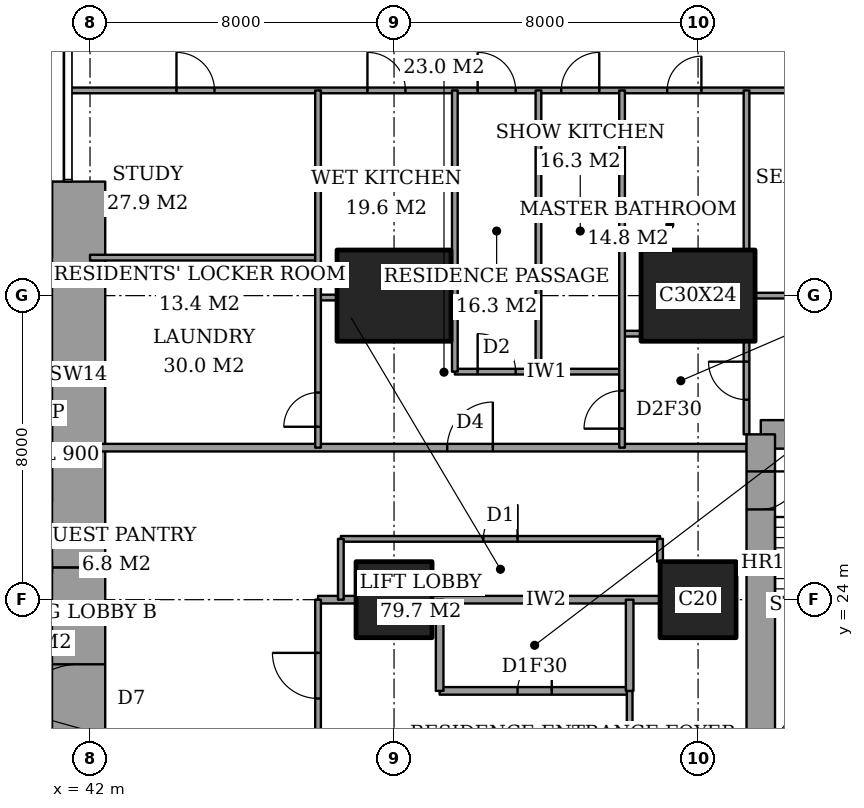
"""IFC4 building model, lengths in metres.
Left out: names, types, materials, properties, quantities, classifications, styles, units other than length and angle.
Written with IfcOpenShell. Run it as: python <this file> out.ifc"""

import sys

from ifc_helpers import new_model, si_unit, direction, frame, frame_2d, origin, origin_2d, place, context, subcontext, project, spatial, rectangle, extrude, element, fill, save


model = new_model("IFC4")
c1 = context("Model", 3, precision=1e-05, world=origin(), true_north=direction((0.0, 1.0)))
c2 = subcontext(c1, "Body", "Model", "MODEL_VIEW")
j1 = project(units=[si_unit("LENGTHUNIT", "METRE"), si_unit("PLANEANGLEUNIT", "RADIAN")], contexts=[c1])
p1 = place(None, origin())
s1 = spatial("IfcSite", under=j1, at=p1, CompositionType="ELEMENT")
p2 = place(p1, origin())
s2 = spatial("IfcBuilding", under=s1, at=p2, CompositionType="ELEMENT")
p3 = place(p2, frame((0.0, 0.0, 110.6)))
s3 = spatial("IfcBuildingStorey", under=s2, at=p3, CompositionType="ELEMENT", Elevation=110.6)
p4 = place(p3, frame((50.0, 24.0, 0.0), z_axis=(0.0, 0.0, 1.0), x_axis=(1.0, 0.0, 0.0)))
e1 = element("IfcColumn", 1, at=p4, inside=s3, PredefinedType="COLUMN", context=c2, shape_type="SweptSolid", body=[
    extrude(rectangle(XDim=2.0, YDim=2.0, at=origin_2d()), origin(), (0.0, 0.0, 1.0), 3.6),
])
p5 = place(p3, frame((50.0, 32.0, 0.0), z_axis=(0.0, 0.0, 1.0), x_axis=(1.0, 0.0, 0.0)))
e2 = element("IfcColumn", 2, at=p5, inside=s3, PredefinedType="COLUMN", context=c2, shape_type="SweptSolid", body=[
    extrude(rectangle(XDim=3.0, YDim=2.4, at=origin_2d()), origin(), (0.0, 0.0, 1.0), 3.6),
])
p6 = place(p3, frame((58.0, 24.0, 0.0), z_axis=(0.0, 0.0, 1.0), x_axis=(1.0, 0.0, 0.0)))
e3 = element("IfcColumn", 3, at=p6, inside=s3, PredefinedType="COLUMN", context=c2, shape_type="SweptSolid", body=[
    extrude(rectangle(XDim=2.0, YDim=2.0, at=origin_2d()), origin(), (0.0, 0.0, 1.0), 3.6),
])
p7 = place(p3, frame((58.0, 32.0, 0.0), z_axis=(0.0, 0.0, 1.0), x_axis=(1.0, 0.0, 0.0)))
e4 = element("IfcColumn", 4, at=p7, inside=s3, PredefinedType="COLUMN", context=c2, shape_type="SweptSolid", body=[
    extrude(rectangle(XDim=3.0, YDim=2.4, at=origin_2d()), origin(), (0.0, 0.0, 1.0), 3.6),
])
p8 = place(p3, frame((41.7, 13.0, 0.0), z_axis=(0.0, 0.0, 1.0), x_axis=(0.0, 1.0, 0.0)))
e5 = element("IfcWall", 5, at=p8, inside=s3, PredefinedType="SHEAR", context=c2, shape_type="SweptSolid", body=[
    extrude(rectangle(XDim=11.85, YDim=1.4, at=frame_2d((5.925, 0.0))), origin(), (0.0, 0.0, 1.0), 3.6),
])
p9 = place(p8, frame((7.5, 0.0, 0.0)))
e6 = element("IfcOpeningElement", 6, at=p9, cuts=e5, PredefinedType="OPENING", context=c2, shape_type="SweptSolid", body=[
    extrude(rectangle(XDim=1.8, YDim=2.4, at=frame_2d((0.9, 1.2))), frame((0.0, 0.71, 0.0), z_axis=(0.0, -1.0, 0.0), x_axis=(1.0, 0.0, 0.0)), (0.0, 0.0, 1.0), 1.42),
])
p10 = place(p3, frame((41.7, 24.85, 0.0), z_axis=(0.0, 0.0, 1.0), x_axis=(0.0, 1.0, 0.0)))
e7 = element("IfcWall", 7, at=p10, inside=s3, PredefinedType="SHEAR", context=c2, shape_type="SweptSolid", body=[
    extrude(rectangle(XDim=10.15, YDim=1.4, at=frame_2d((5.075, 0.0))), origin(), (0.0, 0.0, 1.0), 3.6),
])
p11 = place(p3, frame((64.1, 28.35, 0.0), z_axis=(0.0, 0.0, 1.0), x_axis=(-1.0, 0.0, 0.0)))
e8 = element("IfcWall", 8, at=p11, inside=s3, PredefinedType="SHEAR", context=c2, shape_type="SweptSolid", body=[
    extrude(rectangle(XDim=4.45, YDim=0.75, at=frame_2d((2.225, 0.0))), origin(), (0.0, 0.0, 1.0), 3.6),
])
p12 = place(p3, frame((59.65, 28.35, 0.0), z_axis=(0.0, 0.0, 1.0), x_axis=(0.0, -1.0, 0.0)))
e9 = element("IfcWall", 9, at=p12, inside=s3, PredefinedType="SHEAR", context=c2, shape_type="SweptSolid", body=[
    extrude(rectangle(XDim=8.7, YDim=0.75, at=frame_2d((4.35, 0.0))), origin(), (0.0, 0.0, 1.0), 3.6),
])
p13 = place(p12, frame((0.975, 0.0, 0.0)))
e10 = element("IfcOpeningElement", 10, at=p13, cuts=e9, PredefinedType="OPENING", context=c2, shape_type="SweptSolid", body=[
    extrude(rectangle(XDim=1.0, YDim=2.1, at=frame_2d((0.5, 1.05))), frame((0.0, 0.385, 0.0), z_axis=(0.0, -1.0, 0.0), x_axis=(1.0, 0.0, 0.0)), (0.0, 0.0, 1.0), 0.77),
])
p14 = place(p3, frame((51.2, 21.6, 0.0), z_axis=(0.0, 0.0, 1.0), x_axis=(1.0, 0.0, 0.0)))
e11 = element("IfcWall", 11, at=p14, inside=s3, PredefinedType="PARTITIONING", context=c2, shape_type="SweptSolid", body=[
    extrude(rectangle(XDim=5.0, YDim=0.2, at=frame_2d((2.5, 0.0))), origin(), (0.0, 0.0, 1.0), 3.35),
])
p15 = place(p14, frame((2.05, 0.0, 0.0)))
e12 = element("IfcOpeningElement", 12, at=p15, cuts=e11, PredefinedType="OPENING", context=c2, shape_type="SweptSolid", body=[
    extrude(rectangle(XDim=0.9, YDim=2.1, at=frame_2d((0.45, 1.05))), frame((0.0, 0.11, 0.0), z_axis=(0.0, -1.0, 0.0), x_axis=(1.0, 0.0, 0.0)), (0.0, 0.0, 1.0), 0.22),
])
p16 = place(p3, frame((48.0, 24.0, 0.0), z_axis=(0.0, 0.0, 1.0), x_axis=(1.0, 0.0, 0.0)))
e13 = element("IfcWall", 13, at=p16, inside=s3, PredefinedType="PARTITIONING", context=c2, shape_type="SweptSolid", body=[
    extrude(rectangle(XDim=1.0, YDim=0.2, at=frame_2d((0.5, 0.0))), origin(), (0.0, 0.0, 1.0), 3.35),
])
p17 = place(p3, frame((51.0, 24.0, 0.0), z_axis=(0.0, 0.0, 1.0), x_axis=(1.0, 0.0, 0.0)))
e14 = element("IfcWall", 14, at=p17, inside=s3, PredefinedType="PARTITIONING", context=c2, shape_type="SweptSolid", body=[
    extrude(rectangle(XDim=6.0, YDim=0.2, at=frame_2d((3.0, 0.0))), origin(), (0.0, 0.0, 1.0), 3.35),
])
p18 = place(p3, frame((48.6, 25.6, 0.0), z_axis=(0.0, 0.0, 1.0), x_axis=(1.0, 0.0, 0.0)))
e15 = element("IfcWall", 15, at=p18, inside=s3, PredefinedType="PARTITIONING", context=c2, shape_type="SweptSolid", body=[
    extrude(rectangle(XDim=8.4, YDim=0.15, at=frame_2d((4.2, 0.0))), origin(), (0.0, 0.0, 1.0), 3.35),
])
p19 = place(p18, frame((3.75, 0.0, 0.0)))
e16 = element("IfcOpeningElement", 16, at=p19, cuts=e15, PredefinedType="OPENING", context=c2, shape_type="SweptSolid", body=[
    extrude(rectangle(XDim=0.9, YDim=2.1, at=frame_2d((0.45, 1.05))), frame((0.0, 0.085, 0.0), z_axis=(0.0, -1.0, 0.0), x_axis=(1.0, 0.0, 0.0)), (0.0, 0.0, 1.0), 0.17),
])
p20 = place(p3, frame((42.0, 28.0, 0.0), z_axis=(0.0, 0.0, 1.0), x_axis=(1.0, 0.0, 0.0)))
e17 = element("IfcWall", 17, at=p20, inside=s3, PredefinedType="PARTITIONING", context=c2, shape_type="SweptSolid", body=[
    extrude(rectangle(XDim=17.275, YDim=0.2, at=frame_2d((8.637, 0.0))), origin(), (0.0, 0.0, 1.0), 3.35),
])
p21 = place(p20, frame((9.4, 0.0, 0.0)))
e18 = element("IfcOpeningElement", 18, at=p21, cuts=e17, PredefinedType="OPENING", context=c2, shape_type="SweptSolid", body=[
    extrude(rectangle(XDim=1.2, YDim=2.4, at=frame_2d((0.6, 1.2))), frame((0.0, 0.11, 0.0), z_axis=(0.0, -1.0, 0.0), x_axis=(1.0, 0.0, 0.0)), (0.0, 0.0, 1.0), 0.22),
])
p22 = place(p3, frame((51.6, 30.0, 0.0), z_axis=(0.0, 0.0, 1.0), x_axis=(1.0, 0.0, 0.0)))
e19 = element("IfcWall", 19, at=p22, inside=s3, PredefinedType="PARTITIONING", context=c2, shape_type="SweptSolid", body=[
    extrude(rectangle(XDim=4.4, YDim=0.15, at=frame_2d((2.2, 0.0))), origin(), (0.0, 0.0, 1.0), 3.35),
])
p23 = place(p22, frame((0.6, 0.0, 0.0)))
e20 = element("IfcOpeningElement", 20, at=p23, cuts=e19, PredefinedType="OPENING", context=c2, shape_type="SweptSolid", body=[
    extrude(rectangle(XDim=1.0, YDim=2.1, at=frame_2d((0.5, 1.05))), frame((0.0, 0.085, 0.0), z_axis=(0.0, -1.0, 0.0), x_axis=(1.0, 0.0, 0.0)), (0.0, 0.0, 1.0), 0.17),
])
p24 = place(p3, frame((56.0, 31.0, 0.0), z_axis=(0.0, 0.0, 1.0), x_axis=(1.0, 0.0, 0.0)))
e21 = element("IfcWall", 21, at=p24, inside=s3, PredefinedType="PARTITIONING", context=c2, shape_type="SweptSolid", body=[
    extrude(rectangle(XDim=0.5, YDim=0.15, at=frame_2d((0.25, 0.0))), origin(), (0.0, 0.0, 1.0), 3.35),
])
p25 = place(p3, frame((48.0, 31.95, 0.0), z_axis=(0.0, 0.0, 1.0), x_axis=(1.0, 0.0, 0.0)))
e22 = element("IfcWall", 22, at=p25, inside=s3, PredefinedType="PARTITIONING", context=c2, shape_type="SweptSolid", body=[
    extrude(rectangle(XDim=0.5, YDim=0.15, at=frame_2d((0.25, 0.0))), origin(), (0.0, 0.0, 1.0), 2.634),
])
p26 = place(p3, frame((59.5, 32.0, 0.0), z_axis=(0.0, 0.0, 1.0), x_axis=(1.0, 0.0, 0.0)))
e23 = element("IfcWall", 23, at=p26, inside=s3, PredefinedType="PARTITIONING", context=c2, shape_type="SweptSolid", body=[
    extrude(rectangle(XDim=5.15, YDim=0.15, at=frame_2d((2.575, 0.0))), origin(), (0.0, 0.0, 1.0), 2.634),
])
p27 = place(p3, frame((42.0, 33.0, 0.0), z_axis=(0.0, 0.0, 1.0), x_axis=(1.0, 0.0, 0.0)))
e24 = element("IfcWall", 24, at=p27, inside=s3, PredefinedType="PARTITIONING", context=c2, shape_type="SweptSolid", body=[
    extrude(rectangle(XDim=6.0, YDim=0.15, at=frame_2d((3.0, 0.0))), origin(), (0.0, 0.0, 1.0), 3.35),
])
p28 = place(p3, frame((41.439, 37.4, 0.0), z_axis=(0.0, 0.0, 1.0), x_axis=(1.0, 0.0, 0.0)))
e25 = element("IfcWall", 25, at=p28, inside=s3, PredefinedType="PARTITIONING", context=c2, shape_type="SweptSolid", body=[
    extrude(rectangle(XDim=25.011, YDim=0.15, at=frame_2d((12.505, 0.0))), origin(), (0.0, 0.0, 1.0), 3.35),
])
p29 = place(p28, frame((10.761, 0.0, 0.0)))
e26 = element("IfcOpeningElement", 26, at=p29, cuts=e25, PredefinedType="OPENING", context=c2, shape_type="SweptSolid", body=[
    extrude(rectangle(XDim=1.0, YDim=2.1, at=frame_2d((0.5, 1.05))), frame((0.0, 0.085, 0.0), z_axis=(0.0, -1.0, 0.0), x_axis=(1.0, 0.0, 0.0)), (0.0, 0.0, 1.0), 0.17),
])
p30 = place(p28, frame((20.924, 0.0, 0.0)))
e27 = element("IfcOpeningElement", 27, at=p30, cuts=e25, PredefinedType="OPENING", context=c2, shape_type="SweptSolid", body=[
    extrude(rectangle(XDim=1.0, YDim=2.1, at=frame_2d((0.5, 1.05))), frame((0.0, 0.085, 0.0), z_axis=(0.0, -1.0, 0.0), x_axis=(1.0, 0.0, 0.0)), (0.0, 0.0, 1.0), 0.17),
])
p31 = place(p28, frame((15.749, 0.0, 0.0)))
e28 = element("IfcOpeningElement", 28, at=p31, cuts=e25, PredefinedType="OPENING", context=c2, shape_type="SweptSolid", body=[
    extrude(rectangle(XDim=0.9, YDim=2.1, at=frame_2d((0.45, 1.05))), frame((0.0, 0.085, 0.0), z_axis=(0.0, -1.0, 0.0), x_axis=(1.0, 0.0, 0.0)), (0.0, 0.0, 1.0), 0.17),
])
p32 = place(p28, frame((12.961, 0.0, 0.0)))
e29 = element("IfcOpeningElement", 29, at=p32, cuts=e25, PredefinedType="OPENING", context=c2, shape_type="SweptSolid", body=[
    extrude(rectangle(XDim=1.0, YDim=2.1, at=frame_2d((0.5, 1.05))), frame((0.0, 0.085, 0.0), z_axis=(0.0, -1.0, 0.0), x_axis=(1.0, 0.0, 0.0)), (0.0, 0.0, 1.0), 0.17),
])
p33 = place(p28, frame((7.861, 0.0, 0.0)))
e30 = element("IfcOpeningElement", 30, at=p33, cuts=e25, PredefinedType="OPENING", context=c2, shape_type="SweptSolid", body=[
    extrude(rectangle(XDim=1.0, YDim=2.1, at=frame_2d((0.5, 1.05))), frame((0.0, 0.085, 0.0), z_axis=(0.0, -1.0, 0.0), x_axis=(1.0, 0.0, 0.0)), (0.0, 0.0, 1.0), 0.17),
])
p34 = place(p28, frame((2.836, 0.0, 0.0)))
e31 = element("IfcOpeningElement", 31, at=p34, cuts=e25, PredefinedType="OPENING", context=c2, shape_type="SweptSolid", body=[
    extrude(rectangle(XDim=1.0, YDim=2.1, at=frame_2d((0.5, 1.05))), frame((0.0, 0.085, 0.0), z_axis=(0.0, -1.0, 0.0), x_axis=(1.0, 0.0, 0.0)), (0.0, 0.0, 1.0), 0.17),
])
p35 = place(p3, frame((48.0, 10.6, 0.0), z_axis=(0.0, 0.0, 1.0), x_axis=(0.0, 1.0, 0.0)))
e32 = element("IfcWall", 32, at=p35, inside=s3, PredefinedType="PARTITIONING", context=c2, shape_type="SweptSolid", body=[
    extrude(rectangle(XDim=13.4, YDim=0.15, at=frame_2d((6.7, 0.0))), origin(), (0.0, 0.0, 1.0), 3.35),
])
p36 = place(p35, frame((10.8, 0.0, 0.0)))
e33 = element("IfcOpeningElement", 33, at=p36, cuts=e32, PredefinedType="OPENING", context=c2, shape_type="SweptSolid", body=[
    extrude(rectangle(XDim=1.2, YDim=2.4, at=frame_2d((0.6, 1.2))), frame((0.0, 0.085, 0.0), z_axis=(0.0, -1.0, 0.0), x_axis=(1.0, 0.0, 0.0)), (0.0, 0.0, 1.0), 0.17),
])
p37 = place(p35, frame((6.7, 0.0, 0.0)))
e34 = element("IfcOpeningElement", 34, at=p37, cuts=e32, PredefinedType="OPENING", context=c2, shape_type="SweptSolid", body=[
    extrude(rectangle(XDim=0.9, YDim=2.1, at=frame_2d((0.45, 1.05))), frame((0.0, 0.085, 0.0), z_axis=(0.0, -1.0, 0.0), x_axis=(1.0, 0.0, 0.0)), (0.0, 0.0, 1.0), 0.17),
])
p38 = place(p3, frame((48.0, 28.0, 0.0), z_axis=(0.0, 0.0, 1.0), x_axis=(0.0, 1.0, 0.0)))
e35 = element("IfcWall", 35, at=p38, inside=s3, PredefinedType="PARTITIONING", context=c2, shape_type="SweptSolid", body=[
    extrude(rectangle(XDim=9.4, YDim=0.15, at=frame_2d((4.7, 0.0))), origin(), (0.0, 0.0, 1.0), 3.35),
])
p39 = place(p38, frame((0.55, 0.0, 0.0)))
e36 = element("IfcOpeningElement", 36, at=p39, cuts=e35, PredefinedType="OPENING", context=c2, shape_type="SweptSolid", body=[
    extrude(rectangle(XDim=0.9, YDim=2.1, at=frame_2d((0.45, 1.05))), frame((0.0, 0.085, 0.0), z_axis=(0.0, -1.0, 0.0), x_axis=(1.0, 0.0, 0.0)), (0.0, 0.0, 1.0), 0.17),
])
p40 = place(p3, frame((48.6, 24.0, 0.0), z_axis=(0.0, 0.0, 1.0), x_axis=(0.0, 1.0, 0.0)))
e37 = element("IfcWall", 37, at=p40, inside=s3, PredefinedType="PARTITIONING", context=c2, shape_type="SweptSolid", body=[
    extrude(rectangle(XDim=1.6, YDim=0.15, at=frame_2d((0.8, 0.0))), origin(), (0.0, 0.0, 1.0), 3.35),
])
p41 = place(p3, frame((51.2, 21.6, 0.0), z_axis=(0.0, 0.0, 1.0), x_axis=(0.0, 1.0, 0.0)))
e38 = element("IfcWall", 38, at=p41, inside=s3, PredefinedType="PARTITIONING", context=c2, shape_type="SweptSolid", body=[
    extrude(rectangle(XDim=2.4, YDim=0.2, at=frame_2d((1.2, 0.0))), origin(), (0.0, 0.0, 1.0), 3.35),
])
for number, where, z_axis, x_axis in (
    (39, (51.6, 30.0, 0.0), (0.0, 0.0, 1.0), (0.0, 1.0, 0.0)),
    (40, (53.8, 30.0, 0.0), (0.0, 0.0, 1.0), (0.0, 1.0, 0.0)),
):
    element("IfcWall", number, at=place(p3, frame(where, z_axis=z_axis, x_axis=x_axis)), inside=s3, PredefinedType="PARTITIONING", context=c2, shape_type="SweptSolid", body=[
        extrude(rectangle(XDim=7.4, YDim=0.15, at=frame_2d((3.7, 0.0))), origin(), (0.0, 0.0, 1.0), 3.35),
    ])
p42 = place(p3, frame((56.0, 28.0, 0.0), z_axis=(0.0, 0.0, 1.0), x_axis=(0.0, 1.0, 0.0)))
e41 = element("IfcWall", 41, at=p42, inside=s3, PredefinedType="PARTITIONING", context=c2, shape_type="SweptSolid", body=[
    extrude(rectangle(XDim=9.4, YDim=0.15, at=frame_2d((4.7, 0.0))), origin(), (0.0, 0.0, 1.0), 3.35),
])
p43 = place(p42, frame((0.5, 0.0, 0.0)))
e42 = element("IfcOpeningElement", 42, at=p43, cuts=e41, PredefinedType="OPENING", context=c2, shape_type="SweptSolid", body=[
    extrude(rectangle(XDim=1.0, YDim=2.1, at=frame_2d((0.5, 1.05))), frame((0.0, 0.085, 0.0), z_axis=(0.0, -1.0, 0.0), x_axis=(1.0, 0.0, 0.0)), (0.0, 0.0, 1.0), 0.17),
])
p44 = place(p3, frame((56.2, 21.6, 0.0), z_axis=(0.0, 0.0, 1.0), x_axis=(0.0, 1.0, 0.0)))
e43 = element("IfcWall", 43, at=p44, inside=s3, PredefinedType="PARTITIONING", context=c2, shape_type="SweptSolid", body=[
    extrude(rectangle(XDim=2.4, YDim=0.2, at=frame_2d((1.2, 0.0))), origin(), (0.0, 0.0, 1.0), 3.35),
])
p45 = place(p3, frame((56.2, 10.6, 0.0), z_axis=(0.0, 0.0, 1.0), x_axis=(0.0, 1.0, 0.0)))
e44 = element("IfcWall", 44, at=p45, inside=s3, PredefinedType="PARTITIONING", context=c2, shape_type="SweptSolid", body=[
    extrude(rectangle(XDim=11.0, YDim=0.15, at=frame_2d((5.5, 0.0))), origin(), (0.0, 0.0, 1.0), 3.35),
])
p46 = place(p45, frame((7.0, 0.0, 0.0)))
e45 = element("IfcOpeningElement", 45, at=p46, cuts=e44, PredefinedType="OPENING", context=c2, shape_type="SweptSolid", body=[
    extrude(rectangle(XDim=1.0, YDim=2.1, at=frame_2d((0.5, 1.05))), frame((0.0, 0.085, 0.0), z_axis=(0.0, -1.0, 0.0), x_axis=(1.0, 0.0, 0.0)), (0.0, 0.0, 1.0), 0.17),
])
p47 = place(p3, frame((57.0, 25.0, 0.0), z_axis=(0.0, 0.0, 1.0), x_axis=(0.0, 1.0, 0.0)))
e46 = element("IfcWall", 46, at=p47, inside=s3, PredefinedType="PARTITIONING", context=c2, shape_type="SweptSolid", body=[
    extrude(rectangle(XDim=0.6, YDim=0.15, at=frame_2d((0.3, 0.0))), origin(), (0.0, 0.0, 1.0), 3.35),
])
p48 = place(p3, frame((59.275, 28.35, 0.0), z_axis=(0.0, 0.0, 1.0), x_axis=(0.0, 1.0, 0.0)))
e47 = element("IfcWall", 47, at=p48, inside=s3, PredefinedType="PARTITIONING", context=c2, shape_type="SweptSolid", body=[
    extrude(rectangle(XDim=2.45, YDim=0.15, at=frame_2d((1.225, 0.0))), origin(), (0.0, 0.0, 1.0), 3.35),
])
p49 = place(p48, frame((0.913, 0.0, 0.0)))
e48 = element("IfcOpeningElement", 48, at=p49, cuts=e47, PredefinedType="OPENING", context=c2, shape_type="SweptSolid", body=[
    extrude(rectangle(XDim=1.0, YDim=2.1, at=frame_2d((0.5, 1.05))), frame((0.0, 0.085, 0.0), z_axis=(0.0, -1.0, 0.0), x_axis=(1.0, 0.0, 0.0)), (0.0, 0.0, 1.0), 0.17),
])
p50 = place(p3, frame((59.275, 33.2, 0.0), z_axis=(0.0, 0.0, 1.0), x_axis=(0.0, 1.0, 0.0)))
e49 = element("IfcWall", 49, at=p50, inside=s3, PredefinedType="PARTITIONING", context=c2, shape_type="SweptSolid", body=[
    extrude(rectangle(XDim=4.2, YDim=0.15, at=frame_2d((2.1, 0.0))), origin(), (0.0, 0.0, 1.0), 3.35),
])
p51 = place(p15, origin())
e50 = element("IfcDoor", 50, at=p51, inside=s3, OperationType="SINGLE_SWING_LEFT", PredefinedType="DOOR", context=c2, shape_type="SweptSolid", body=[
    extrude(rectangle(XDim=0.9, YDim=2.1, at=frame_2d((0.45, 1.05))), frame((0.0, 0.025, 0.0), z_axis=(0.0, -1.0, 0.0), x_axis=(1.0, 0.0, 0.0)), (0.0, 0.0, 1.0), 0.05),
])
fill(e12, e50)
p52 = place(p36, origin())
e51 = element("IfcDoor", 51, at=p52, inside=s3, OperationType="SINGLE_SWING_LEFT", PredefinedType="DOOR", context=c2, shape_type="SweptSolid", body=[
    extrude(rectangle(XDim=1.2, YDim=2.4, at=frame_2d((0.6, 1.2))), frame((0.0, 0.025, 0.0), z_axis=(0.0, -1.0, 0.0), x_axis=(1.0, 0.0, 0.0)), (0.0, 0.0, 1.0), 0.05),
])
fill(e33, e51)
p53 = place(p29, origin())
e52 = element("IfcDoor", 52, at=p53, inside=s3, OperationType="SINGLE_SWING_RIGHT", PredefinedType="DOOR", context=c2, shape_type="SweptSolid", body=[
    extrude(rectangle(XDim=1.0, YDim=2.1, at=frame_2d((0.5, 1.05))), frame((0.0, 0.025, 0.0), z_axis=(0.0, -1.0, 0.0), x_axis=(1.0, 0.0, 0.0)), (0.0, 0.0, 1.0), 0.05),
])
fill(e26, e52)
p54 = place(p49, origin())
e53 = element("IfcDoor", 53, at=p54, inside=s3, OperationType="SINGLE_SWING_LEFT", PredefinedType="DOOR", context=c2, shape_type="SweptSolid", body=[
    extrude(rectangle(XDim=1.0, YDim=2.1, at=frame_2d((0.5, 1.05))), frame((0.0, 0.025, 0.0), z_axis=(0.0, -1.0, 0.0), x_axis=(1.0, 0.0, 0.0)), (0.0, 0.0, 1.0), 0.05),
])
fill(e48, e53)
p55 = place(p31, origin())
e54 = element("IfcDoor", 54, at=p55, inside=s3, OperationType="SINGLE_SWING_LEFT", PredefinedType="DOOR", context=c2, shape_type="SweptSolid", body=[
    extrude(rectangle(XDim=0.9, YDim=2.1, at=frame_2d((0.45, 1.05))), frame((0.0, 0.025, 0.0), z_axis=(0.0, -1.0, 0.0), x_axis=(1.0, 0.0, 0.0)), (0.0, 0.0, 1.0), 0.05),
])
fill(e28, e54)
p56 = place(p43, origin())
e55 = element("IfcDoor", 55, at=p56, inside=s3, OperationType="SINGLE_SWING_RIGHT", PredefinedType="DOOR", context=c2, shape_type="SweptSolid", body=[
    extrude(rectangle(XDim=1.0, YDim=2.1, at=frame_2d((0.5, 1.05))), frame((0.0, 0.025, 0.0), z_axis=(0.0, -1.0, 0.0), x_axis=(1.0, 0.0, 0.0)), (0.0, 0.0, 1.0), 0.05),
])
fill(e42, e55)
p57 = place(p21, origin())
e56 = element("IfcDoor", 56, at=p57, inside=s3, OperationType="SINGLE_SWING_LEFT", PredefinedType="DOOR", context=c2, shape_type="SweptSolid", body=[
    extrude(rectangle(XDim=1.2, YDim=2.4, at=frame_2d((0.6, 1.2))), frame((0.0, 0.025, 0.0), z_axis=(0.0, -1.0, 0.0), x_axis=(1.0, 0.0, 0.0)), (0.0, 0.0, 1.0), 0.05),
])
fill(e18, e56)
p58 = place(p32, origin())
e57 = element("IfcDoor", 57, at=p58, inside=s3, OperationType="SINGLE_SWING_LEFT", PredefinedType="DOOR", context=c2, shape_type="SweptSolid", body=[
    extrude(rectangle(XDim=1.0, YDim=2.1, at=frame_2d((0.5, 1.05))), frame((0.0, 0.025, 0.0), z_axis=(0.0, -1.0, 0.0), x_axis=(1.0, 0.0, 0.0)), (0.0, 0.0, 1.0), 0.05),
])
fill(e29, e57)
p59 = place(p23, origin())
e58 = element("IfcDoor", 58, at=p59, inside=s3, OperationType="SINGLE_SWING_RIGHT", PredefinedType="DOOR", context=c2, shape_type="SweptSolid", body=[
    extrude(rectangle(XDim=1.0, YDim=2.1, at=frame_2d((0.5, 1.05))), frame((0.0, 0.025, 0.0), z_axis=(0.0, -1.0, 0.0), x_axis=(1.0, 0.0, 0.0)), (0.0, 0.0, 1.0), 0.05),
])
fill(e20, e58)
p60 = place(p33, origin())
e59 = element("IfcDoor", 59, at=p60, inside=s3, OperationType="SINGLE_SWING_RIGHT", PredefinedType="DOOR", context=c2, shape_type="SweptSolid", body=[
    extrude(rectangle(XDim=1.0, YDim=2.1, at=frame_2d((0.5, 1.05))), frame((0.0, 0.025, 0.0), z_axis=(0.0, -1.0, 0.0), x_axis=(1.0, 0.0, 0.0)), (0.0, 0.0, 1.0), 0.05),
])
fill(e30, e59)
p61 = place(p34, origin())
e60 = element("IfcDoor", 60, at=p61, inside=s3, OperationType="SINGLE_SWING_RIGHT", PredefinedType="DOOR", context=c2, shape_type="SweptSolid", body=[
    extrude(rectangle(XDim=1.0, YDim=2.1, at=frame_2d((0.5, 1.05))), frame((0.0, 0.025, 0.0), z_axis=(0.0, -1.0, 0.0), x_axis=(1.0, 0.0, 0.0)), (0.0, 0.0, 1.0), 0.05),
])
fill(e31, e60)
p62 = place(p39, origin())
e61 = element("IfcDoor", 61, at=p62, inside=s3, OperationType="SINGLE_SWING_RIGHT", PredefinedType="DOOR", context=c2, shape_type="SweptSolid", body=[
    extrude(rectangle(XDim=0.9, YDim=2.1, at=frame_2d((0.45, 1.05))), frame((0.0, 0.025, 0.0), z_axis=(0.0, -1.0, 0.0), x_axis=(1.0, 0.0, 0.0)), (0.0, 0.0, 1.0), 0.05),
])
fill(e36, e61)
p63 = place(p19, origin())
e62 = element("IfcDoor", 62, at=p63, inside=s3, OperationType="SINGLE_SWING_LEFT", PredefinedType="DOOR", context=c2, shape_type="SweptSolid", body=[
    extrude(rectangle(XDim=0.9, YDim=2.1, at=frame_2d((0.45, 1.05))), frame((0.0, 0.025, 0.0), z_axis=(0.0, -1.0, 0.0), x_axis=(1.0, 0.0, 0.0)), (0.0, 0.0, 1.0), 0.05),
])
fill(e16, e62)
p64 = place(p9, origin())
e63 = element("IfcDoor", 63, at=p64, inside=s3, OperationType="DOUBLE_DOOR_DOUBLE_SWING", PredefinedType="DOOR", context=c2, shape_type="SweptSolid", body=[
    extrude(rectangle(XDim=1.8, YDim=2.4, at=frame_2d((0.9, 1.2))), frame((0.0, 0.025, 0.0), z_axis=(0.0, -1.0, 0.0), x_axis=(1.0, 0.0, 0.0)), (0.0, 0.0, 1.0), 0.05),
])
fill(e6, e63)
p65 = place(p13, origin())
e64 = element("IfcDoor", 64, at=p65, inside=s3, OperationType="SINGLE_SWING_RIGHT", PredefinedType="DOOR", context=c2, shape_type="SweptSolid", body=[
    extrude(rectangle(XDim=1.0, YDim=2.1, at=frame_2d((0.5, 1.05))), frame((0.0, 0.025, 0.0), z_axis=(0.0, -1.0, 0.0), x_axis=(1.0, 0.0, 0.0)), (0.0, 0.0, 1.0), 0.05),
])
fill(e10, e64)
save(model, sys.argv[1])
